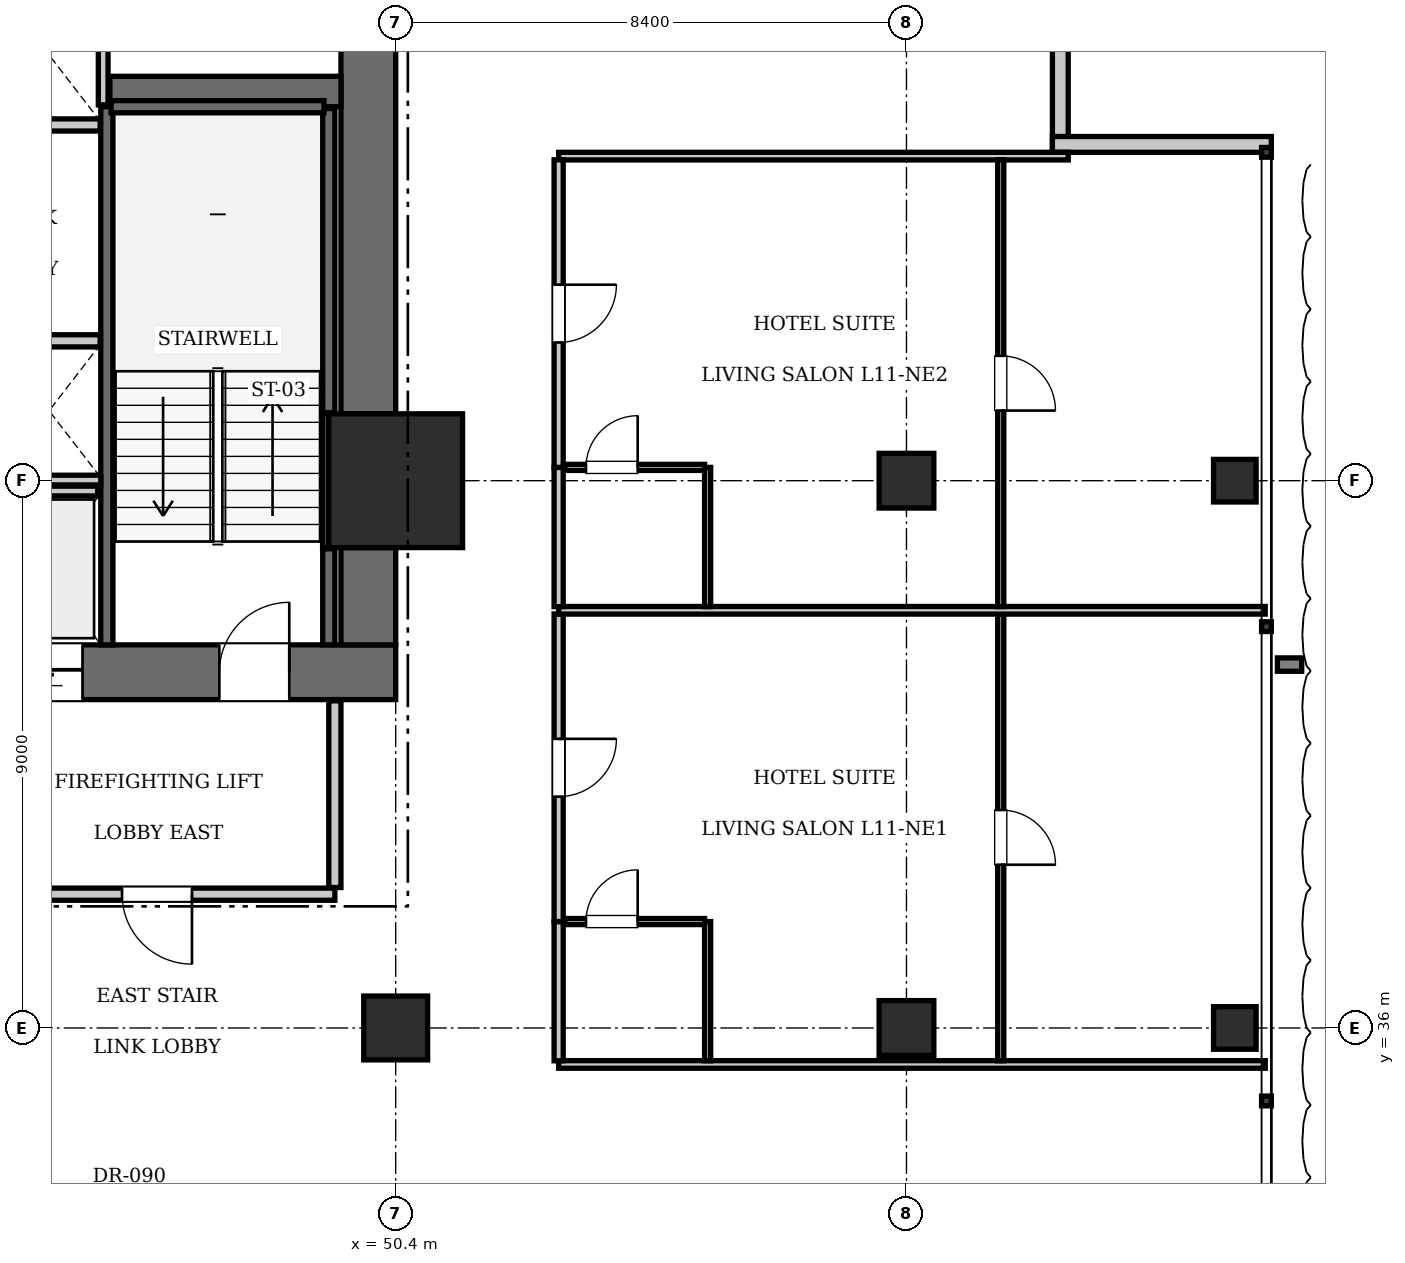
"""IFC4 building model, lengths in metres.
Left out: names, types, materials, properties, quantities, classifications, styles, units other than length and angle.
Written with IfcOpenShell. Run it as: python <this file> out.ifc"""

import sys

from ifc_helpers import new_model, si_unit, direction, frame, frame_2d, origin, origin_2d, place, context, subcontext, project, spatial, rectangle, i_section, extrude, element, fill, save


model = new_model("IFC4")
c1 = context("Model", 3, precision=1e-05, world=origin(), true_north=direction((0.0, 1.0)))
c2 = subcontext(c1, "Body", "Model", "MODEL_VIEW")
j1 = project(units=[si_unit("LENGTHUNIT", "METRE"), si_unit("PLANEANGLEUNIT", "RADIAN")], contexts=[c1])
p1 = place(None, origin())
s1 = spatial("IfcSite", under=j1, at=p1, CompositionType="ELEMENT")
p2 = place(p1, origin())
s2 = spatial("IfcBuilding", under=s1, at=p2, CompositionType="ELEMENT")
p3 = place(p2, frame((0.0, 0.0, 50.05)))
s3 = spatial("IfcBuildingStorey", under=s2, at=p3, CompositionType="ELEMENT", Elevation=50.05)
p4 = place(p3, frame((50.4, 45.0, 0.0), z_axis=(0.0, 0.0, 1.0), x_axis=(1.0, 0.0, 0.0)))
e1 = element("IfcColumn", 1, at=p4, inside=s3, PredefinedType="COLUMN", context=c2, shape_type="SweptSolid", body=[
    extrude(rectangle(XDim=2.2, YDim=2.2, at=origin_2d()), origin(), (0.0, 0.0, 1.0), 3.85),
])
p5 = place(p3, frame((43.6, 41.85, 0.0), z_axis=(0.0, 0.0, 1.0), x_axis=(1.0, 0.0, 0.0)))
e2 = element("IfcWall", 2, at=p5, inside=s3, PredefinedType="SHEAR", context=c2, shape_type="SweptSolid", body=[
    extrude(rectangle(XDim=6.8, YDim=0.9, at=frame_2d((3.4, 0.0))), origin(), (0.0, 0.0, 1.0), 3.85),
])
p6 = place(p5, frame((3.9, 0.0, 0.0)))
e3 = element("IfcOpeningElement", 3, at=p6, cuts=e2, PredefinedType="OPENING", context=c2, shape_type="SweptSolid", body=[
    extrude(rectangle(XDim=1.15, YDim=2.15, at=frame_2d((0.575, 1.075))), frame((0.0, 0.46, 0.0), z_axis=(0.0, -1.0, 0.0), x_axis=(1.0, 0.0, 0.0)), (0.0, 0.0, 1.0), 0.92),
])
p7 = place(p5, frame((0.55, 0.0, 0.0)))
e4 = element("IfcOpeningElement", 4, at=p7, cuts=e2, PredefinedType="OPENING", context=c2, shape_type="SweptSolid", body=[
    extrude(rectangle(XDim=1.1, YDim=2.2, at=frame_2d((0.55, 1.1))), frame((0.0, 0.46, 0.0), z_axis=(0.0, -1.0, 0.0), x_axis=(1.0, 0.0, 0.0)), (0.0, 0.0, 1.0), 0.92),
])
p8 = place(p3, frame((49.95, 42.3, 0.0), z_axis=(0.0, 0.0, 1.0), x_axis=(0.0, 1.0, 0.0)))
e5 = element("IfcWall", 5, at=p8, inside=s3, PredefinedType="SHEAR", context=c2, shape_type="SweptSolid", body=[
    extrude(rectangle(XDim=1.6, YDim=0.9, at=frame_2d((0.8, 0.0))), origin(), (0.0, 0.0, 1.0), 3.85),
])
p9 = place(p3, frame((49.95, 46.1, 0.0), z_axis=(0.0, 0.0, 1.0), x_axis=(0.0, 1.0, 0.0)))
e6 = element("IfcWall", 6, at=p9, inside=s3, PredefinedType="SHEAR", context=c2, shape_type="SweptSolid", body=[
    extrude(rectangle(XDim=7.0, YDim=0.9, at=frame_2d((3.5, 0.0))), origin(), (0.0, 0.0, 1.0), 3.85),
])
p10 = place(p3, frame((45.7, 51.4, 0.0), z_axis=(0.0, 0.0, 1.0), x_axis=(1.0, 0.0, 0.0)))
e7 = element("IfcWall", 7, at=p10, inside=s3, PredefinedType="SHEAR", context=c2, shape_type="SweptSolid", body=[
    extrude(rectangle(XDim=3.8, YDim=0.5, at=frame_2d((1.9, 0.0))), origin(), (0.0, 0.0, 1.0), 3.85),
])
p11 = place(p3, frame((50.4, 36.0, 0.0), z_axis=(0.0, 0.0, 1.0), x_axis=(1.0, 0.0, 0.0)))
e8 = element("IfcColumn", 8, at=p11, inside=s3, PredefinedType="COLUMN", context=c2, shape_type="SweptSolid", body=[
    extrude(rectangle(XDim=1.05, YDim=1.05, at=origin_2d()), origin(), (0.0, 0.0, 1.0), 3.85),
])
for number, where, z_axis, x_axis in (
    (9, (58.8, 36.0, 0.0), (0.0, 0.0, 1.0), (1.0, 0.0, 0.0)),
    (10, (58.8, 45.0, 0.0), (0.0, 0.0, 1.0), (1.0, 0.0, 0.0)),
):
    element("IfcColumn", number, at=place(p3, frame(where, z_axis=z_axis, x_axis=x_axis)), inside=s3, PredefinedType="COLUMN", context=c2, shape_type="SweptSolid", body=[
        extrude(rectangle(XDim=0.9, YDim=0.9, at=origin_2d()), origin(), (0.0, 0.0, 1.0), 3.85),
    ])
for number, where, z_axis, x_axis in (
    (11, (64.2, 36.0, 0.0), (0.0, 0.0, 1.0), (1.0, 0.0, 0.0)),
    (12, (64.2, 45.0, 0.0), (0.0, 0.0, 1.0), (1.0, 0.0, 0.0)),
):
    element("IfcColumn", number, at=place(p3, frame(where, z_axis=z_axis, x_axis=x_axis)), inside=s3, PredefinedType="COLUMN", context=c2, shape_type="SweptSolid", body=[
        extrude(i_section(OverallWidth=0.7, OverallDepth=0.7, WebThickness=0.028, FlangeThickness=0.044, at=origin_2d()), origin(), (0.0, 0.0, 1.0), 3.85),
    ])
p12 = place(p3, frame((45.65, 42.3, 0.0), z_axis=(0.0, 0.0, 1.0), x_axis=(0.0, 1.0, 0.0)))
e13 = element("IfcWall", 13, at=p12, inside=s3, PredefinedType="SOLIDWALL", context=c2, shape_type="SweptSolid", body=[
    extrude(rectangle(XDim=8.85, YDim=0.2, at=frame_2d((4.425, 0.0))), origin(), (0.0, 0.0, 1.0), 3.61),
])
p13 = place(p3, frame((49.3, 42.3, 0.0), z_axis=(0.0, 0.0, 1.0), x_axis=(0.0, 1.0, 0.0)))
e14 = element("IfcWall", 14, at=p13, inside=s3, PredefinedType="SOLIDWALL", context=c2, shape_type="SweptSolid", body=[
    extrude(rectangle(XDim=1.58, YDim=0.2, at=frame_2d((0.79, 0.0))), origin(), (0.0, 0.0, 1.0), 3.61),
])
p14 = place(p3, frame((49.3, 46.12, 0.0), z_axis=(0.0, 0.0, 1.0), x_axis=(0.0, 1.0, 0.0)))
e15 = element("IfcWall", 15, at=p14, inside=s3, PredefinedType="SOLIDWALL", context=c2, shape_type="SweptSolid", body=[
    extrude(rectangle(XDim=5.0, YDim=0.2, at=frame_2d((2.5, 0.0))), origin(), (0.0, 0.0, 1.0), 3.61),
])
p15 = place(p3, frame((45.72, 51.15, 0.0), z_axis=(0.0, 0.0, 1.0), x_axis=(1.0, 0.0, 0.0)))
e16 = element("IfcWall", 16, at=p15, inside=s3, PredefinedType="SOLIDWALL", context=c2, shape_type="SweptSolid", body=[
    extrude(rectangle(XDim=3.5, YDim=0.2, at=frame_2d((1.75, 0.0))), origin(), (0.0, 0.0, 1.0), 3.61),
])
p16 = place(p3, frame((49.248, 43.9, 0.0), z_axis=(0.0, 0.0, 1.0), x_axis=(0.0, 1.0, 0.0)))
e17 = element("IfcWall", 17, at=p16, inside=s3, PredefinedType="SOLIDWALL", context=c2, shape_type="SweptSolid", body=[
    extrude(rectangle(XDim=2.2, YDim=0.1, at=frame_2d((1.1, 0.0))), origin(), (0.0, 0.0, 1.0), 3.61),
])
for number, where, z_axis, x_axis in (
    (18, (43.86, 47.3, 0.0), (0.0, 0.0, 1.0), (1.0, 0.0, 0.0)),
    (19, (43.86, 50.85, 0.0), (0.0, 0.0, 1.0), (1.0, 0.0, 0.0)),
):
    element("IfcWall", number, at=place(p3, frame(where, z_axis=z_axis, x_axis=x_axis)), inside=s3, PredefinedType="SOLIDWALL", context=c2, shape_type="SweptSolid", body=[
        extrude(rectangle(XDim=1.68, YDim=0.2, at=frame_2d((0.84, 0.0))), origin(), (0.0, 0.0, 1.0), 3.61),
    ])
p17 = place(p3, frame((43.9, 44.83, 0.0), z_axis=(0.0, 0.0, 1.0), x_axis=(1.0, 0.0, 0.0)))
e20 = element("IfcWall", 20, at=p17, inside=s3, PredefinedType="SOLIDWALL", context=c2, shape_type="SweptSolid", body=[
    extrude(rectangle(XDim=1.6, YDim=0.16, at=frame_2d((0.8, 0.0))), origin(), (0.0, 0.0, 1.0), 3.61),
])
p18 = place(p3, frame((42.1, 45.01, 0.0), z_axis=(0.0, 0.0, 1.0), x_axis=(1.0, 0.0, 0.0)))
e21 = element("IfcWall", 21, at=p18, inside=s3, PredefinedType="SOLIDWALL", context=c2, shape_type="SweptSolid", body=[
    extrude(rectangle(XDim=3.45, YDim=0.16, at=frame_2d((1.725, 0.0))), origin(), (0.0, 0.0, 1.0), 3.61),
])
p19 = place(p3, frame((45.59, 51.18, 0.0), z_axis=(0.0, 0.0, 1.0), x_axis=(0.0, 1.0, 0.0)))
e22 = element("IfcWall", 22, at=p19, inside=s3, PredefinedType="SOLIDWALL", context=c2, shape_type="SweptSolid", body=[
    extrude(rectangle(XDim=1.92, YDim=0.16, at=frame_2d((0.96, 0.0))), origin(), (0.0, 0.0, 1.0), 3.61),
])
for number, where, z_axis, x_axis in (
    (23, (61.33, 54.0, 0.0), (0.0, 0.0, 1.0), (0.0, -1.0, 0.0)),
    (24, (61.2, 50.53, 0.0), (0.0, 0.0, 1.0), (1.0, 0.0, 0.0)),
):
    element("IfcWall", number, at=place(p3, frame(where, z_axis=z_axis, x_axis=x_axis)), inside=s3, PredefinedType="SOLIDWALL", context=c2, shape_type="SweptSolid", body=[
        extrude(rectangle(XDim=3.6, YDim=0.26, at=frame_2d((1.8, 0.0))), origin(), (0.0, 0.0, 1.0), 3.61),
    ])
p20 = place(p3, frame((43.6, 38.2, 0.0), z_axis=(0.0, 0.0, 1.0), x_axis=(1.0, 0.0, 0.0)))
e25 = element("IfcWall", 25, at=p20, inside=s3, PredefinedType="PARTITIONING", context=c2, shape_type="SweptSolid", body=[
    extrude(rectangle(XDim=5.8, YDim=0.2, at=frame_2d((2.9, 0.0))), origin(), (0.0, 0.0, 1.0), 3.61),
])
p21 = place(p20, frame((2.3, 0.0, 0.0)))
e26 = element("IfcOpeningElement", 26, at=p21, cuts=e25, PredefinedType="OPENING", context=c2, shape_type="SweptSolid", body=[
    extrude(rectangle(XDim=1.15, YDim=2.15, at=frame_2d((0.575, 1.075))), frame((0.0, 0.11, 0.0), z_axis=(0.0, -1.0, 0.0), x_axis=(1.0, 0.0, 0.0)), (0.0, 0.0, 1.0), 0.22),
])
p22 = place(p3, frame((49.4, 38.31, 0.0), z_axis=(0.0, 0.0, 1.0), x_axis=(0.0, 1.0, 0.0)))
e27 = element("IfcWall", 27, at=p22, inside=s3, PredefinedType="PARTITIONING", context=c2, shape_type="SweptSolid", body=[
    extrude(rectangle(XDim=3.07, YDim=0.2, at=frame_2d((1.535, 0.0))), origin(), (0.0, 0.0, 1.0), 3.61),
])
p23 = place(p3, frame((53.08, 35.4, 0.0), z_axis=(0.0, 0.0, 1.0), x_axis=(1.0, 0.0, 0.0)))
e28 = element("IfcWall", 28, at=p23, inside=s3, PredefinedType="PARTITIONING", context=c2, shape_type="SweptSolid", body=[
    extrude(rectangle(XDim=11.62, YDim=0.125, at=frame_2d((5.81, 0.0))), origin(), (0.0, 0.0, 1.0), 3.61),
])
p24 = place(p3, frame((53.08, 50.337, 0.0), z_axis=(0.0, 0.0, 1.0), x_axis=(1.0, 0.0, 0.0)))
e29 = element("IfcWall", 29, at=p24, inside=s3, PredefinedType="PARTITIONING", context=c2, shape_type="SweptSolid", body=[
    extrude(rectangle(XDim=8.38, YDim=0.125, at=frame_2d((4.19, 0.0))), origin(), (0.0, 0.0, 1.0), 3.61),
])
p25 = place(p3, frame((53.08, 35.46, 0.0), z_axis=(0.0, 0.0, 1.0), x_axis=(0.0, 1.0, 0.0)))
e30 = element("IfcWall", 30, at=p25, inside=s3, PredefinedType="PARTITIONING", context=c2, shape_type="SweptSolid", body=[
    extrude(rectangle(XDim=2.29, YDim=0.15, at=frame_2d((1.145, 0.0))), origin(), (0.0, 0.0, 1.0), 3.61),
])
p26 = place(p3, frame((53.08, 37.75, 0.0), z_axis=(0.0, 0.0, 1.0), x_axis=(0.0, 1.0, 0.0)))
e31 = element("IfcWall", 31, at=p26, inside=s3, PredefinedType="PARTITIONING", context=c2, shape_type="SweptSolid", body=[
    extrude(rectangle(XDim=5.059, YDim=0.15, at=frame_2d((2.529, 0.0))), origin(), (0.0, 0.0, 1.0), 3.61),
])
p27 = place(p26, frame((2.054, 0.0, 0.0)))
e32 = element("IfcOpeningElement", 32, at=p27, cuts=e31, PredefinedType="OPENING", context=c2, shape_type="SweptSolid", body=[
    extrude(rectangle(XDim=0.95, YDim=2.15, at=frame_2d((0.475, 1.075))), frame((0.0, 0.085, 0.0), z_axis=(0.0, -1.0, 0.0), x_axis=(1.0, 0.0, 0.0)), (0.0, 0.0, 1.0), 0.17),
])
p28 = place(p3, frame((55.53, 35.46, 0.0), z_axis=(0.0, 0.0, 1.0), x_axis=(0.0, 1.0, 0.0)))
e33 = element("IfcWall", 33, at=p28, inside=s3, PredefinedType="PARTITIONING", context=c2, shape_type="SweptSolid", body=[
    extrude(rectangle(XDim=2.29, YDim=0.1, at=frame_2d((1.145, 0.0))), origin(), (0.0, 0.0, 1.0), 3.61),
])
p29 = place(p3, frame((53.18, 37.75, 0.0), z_axis=(0.0, 0.0, 1.0), x_axis=(1.0, 0.0, 0.0)))
e34 = element("IfcWall", 34, at=p29, inside=s3, PredefinedType="PARTITIONING", context=c2, shape_type="SweptSolid", body=[
    extrude(rectangle(XDim=2.3, YDim=0.1, at=frame_2d((1.15, 0.0))), origin(), (0.0, 0.0, 1.0), 3.61),
])
p30 = place(p29, frame((0.35, 0.0, 0.0)))
e35 = element("IfcOpeningElement", 35, at=p30, cuts=e34, PredefinedType="OPENING", context=c2, shape_type="SweptSolid", body=[
    extrude(rectangle(XDim=0.85, YDim=2.1, at=frame_2d((0.425, 1.05))), frame((0.0, 0.06, 0.0), z_axis=(0.0, -1.0, 0.0), x_axis=(1.0, 0.0, 0.0)), (0.0, 0.0, 1.0), 0.12),
])
p31 = place(p3, frame((60.35, 35.46, 0.0), z_axis=(0.0, 0.0, 1.0), x_axis=(0.0, 1.0, 0.0)))
e36 = element("IfcWall", 36, at=p31, inside=s3, PredefinedType="PARTITIONING", context=c2, shape_type="SweptSolid", body=[
    extrude(rectangle(XDim=7.349, YDim=0.1, at=frame_2d((3.674, 0.0))), origin(), (0.0, 0.0, 1.0), 3.61),
])
p32 = place(p31, frame((3.224, 0.0, 0.0)))
e37 = element("IfcOpeningElement", 37, at=p32, cuts=e36, PredefinedType="OPENING", context=c2, shape_type="SweptSolid", body=[
    extrude(rectangle(XDim=0.9, YDim=2.1, at=frame_2d((0.45, 1.05))), frame((0.0, 0.06, 0.0), z_axis=(0.0, -1.0, 0.0), x_axis=(1.0, 0.0, 0.0)), (0.0, 0.0, 1.0), 0.12),
])
p33 = place(p3, frame((53.08, 42.869, 0.0), z_axis=(0.0, 0.0, 1.0), x_axis=(1.0, 0.0, 0.0)))
e38 = element("IfcWall", 38, at=p33, inside=s3, PredefinedType="PARTITIONING", context=c2, shape_type="SweptSolid", body=[
    extrude(rectangle(XDim=11.62, YDim=0.125, at=frame_2d((5.81, 0.0))), origin(), (0.0, 0.0, 1.0), 3.61),
])
p34 = place(p3, frame((53.08, 42.929, 0.0), z_axis=(0.0, 0.0, 1.0), x_axis=(0.0, 1.0, 0.0)))
e39 = element("IfcWall", 39, at=p34, inside=s3, PredefinedType="PARTITIONING", context=c2, shape_type="SweptSolid", body=[
    extrude(rectangle(XDim=2.29, YDim=0.15, at=frame_2d((1.145, 0.0))), origin(), (0.0, 0.0, 1.0), 3.61),
])
p35 = place(p3, frame((53.08, 45.219, 0.0), z_axis=(0.0, 0.0, 1.0), x_axis=(0.0, 1.0, 0.0)))
e40 = element("IfcWall", 40, at=p35, inside=s3, PredefinedType="PARTITIONING", context=c2, shape_type="SweptSolid", body=[
    extrude(rectangle(XDim=5.059, YDim=0.15, at=frame_2d((2.529, 0.0))), origin(), (0.0, 0.0, 1.0), 3.61),
])
p36 = place(p35, frame((2.054, 0.0, 0.0)))
e41 = element("IfcOpeningElement", 41, at=p36, cuts=e40, PredefinedType="OPENING", context=c2, shape_type="SweptSolid", body=[
    extrude(rectangle(XDim=0.95, YDim=2.15, at=frame_2d((0.475, 1.075))), frame((0.0, 0.085, 0.0), z_axis=(0.0, -1.0, 0.0), x_axis=(1.0, 0.0, 0.0)), (0.0, 0.0, 1.0), 0.17),
])
p37 = place(p3, frame((55.53, 42.929, 0.0), z_axis=(0.0, 0.0, 1.0), x_axis=(0.0, 1.0, 0.0)))
e42 = element("IfcWall", 42, at=p37, inside=s3, PredefinedType="PARTITIONING", context=c2, shape_type="SweptSolid", body=[
    extrude(rectangle(XDim=2.29, YDim=0.1, at=frame_2d((1.145, 0.0))), origin(), (0.0, 0.0, 1.0), 3.61),
])
p38 = place(p3, frame((53.18, 45.219, 0.0), z_axis=(0.0, 0.0, 1.0), x_axis=(1.0, 0.0, 0.0)))
e43 = element("IfcWall", 43, at=p38, inside=s3, PredefinedType="PARTITIONING", context=c2, shape_type="SweptSolid", body=[
    extrude(rectangle(XDim=2.3, YDim=0.1, at=frame_2d((1.15, 0.0))), origin(), (0.0, 0.0, 1.0), 3.61),
])
p39 = place(p38, frame((0.35, 0.0, 0.0)))
e44 = element("IfcOpeningElement", 44, at=p39, cuts=e43, PredefinedType="OPENING", context=c2, shape_type="SweptSolid", body=[
    extrude(rectangle(XDim=0.85, YDim=2.1, at=frame_2d((0.425, 1.05))), frame((0.0, 0.06, 0.0), z_axis=(0.0, -1.0, 0.0), x_axis=(1.0, 0.0, 0.0)), (0.0, 0.0, 1.0), 0.12),
])
p40 = place(p3, frame((60.35, 42.929, 0.0), z_axis=(0.0, 0.0, 1.0), x_axis=(0.0, 1.0, 0.0)))
e45 = element("IfcWall", 45, at=p40, inside=s3, PredefinedType="PARTITIONING", context=c2, shape_type="SweptSolid", body=[
    extrude(rectangle(XDim=7.349, YDim=0.1, at=frame_2d((3.674, 0.0))), origin(), (0.0, 0.0, 1.0), 3.61),
])
p41 = place(p40, frame((3.224, 0.0, 0.0)))
e46 = element("IfcOpeningElement", 46, at=p41, cuts=e45, PredefinedType="OPENING", context=c2, shape_type="SweptSolid", body=[
    extrude(rectangle(XDim=0.9, YDim=2.1, at=frame_2d((0.45, 1.05))), frame((0.0, 0.06, 0.0), z_axis=(0.0, -1.0, 0.0), x_axis=(1.0, 0.0, 0.0)), (0.0, 0.0, 1.0), 0.12),
])
p42 = place(p6, origin())
e47 = element("IfcDoor", 47, at=p42, inside=s3, OperationType="SINGLE_SWING_RIGHT", PredefinedType="DOOR", context=c2, shape_type="SweptSolid", body=[
    extrude(rectangle(XDim=1.15, YDim=2.15, at=frame_2d((0.575, 1.075))), frame((0.0, 0.025, 0.0), z_axis=(0.0, -1.0, 0.0), x_axis=(1.0, 0.0, 0.0)), (0.0, 0.0, 1.0), 0.05),
])
fill(e3, e47)
p43 = place(p7, frame((1.1, 0.0, 0.0), z_axis=(0.0, 0.0, 1.0), x_axis=(-1.0, 0.0, 0.0)))
e48 = element("IfcDoor", 48, at=p43, inside=s3, OperationType="SLIDING_TO_LEFT", PredefinedType="DOOR", context=c2, shape_type="SweptSolid", body=[
    extrude(rectangle(XDim=1.1, YDim=2.2, at=frame_2d((0.55, 1.1))), frame((0.0, 0.025, 0.0), z_axis=(0.0, -1.0, 0.0), x_axis=(1.0, 0.0, 0.0)), (0.0, 0.0, 1.0), 0.05),
])
fill(e4, e48)
p44 = place(p21, frame((1.15, 0.0, 0.0), z_axis=(0.0, 0.0, 1.0), x_axis=(-1.0, 0.0, 0.0)))
e49 = element("IfcDoor", 49, at=p44, inside=s3, OperationType="SINGLE_SWING_LEFT", PredefinedType="DOOR", context=c2, shape_type="SweptSolid", body=[
    extrude(rectangle(XDim=1.15, YDim=2.15, at=frame_2d((0.575, 1.075))), frame((0.0, 0.025, 0.0), z_axis=(0.0, -1.0, 0.0), x_axis=(1.0, 0.0, 0.0)), (0.0, 0.0, 1.0), 0.05),
])
fill(e26, e49)
p45 = place(p30, origin())
e50 = element("IfcDoor", 50, at=p45, inside=s3, OperationType="SINGLE_SWING_RIGHT", PredefinedType="DOOR", context=c2, shape_type="SweptSolid", body=[
    extrude(rectangle(XDim=0.85, YDim=2.1, at=frame_2d((0.425, 1.05))), frame((0.0, 0.025, 0.0), z_axis=(0.0, -1.0, 0.0), x_axis=(1.0, 0.0, 0.0)), (0.0, 0.0, 1.0), 0.05),
])
fill(e35, e50)
p46 = place(p27, frame((0.95, 0.0, 0.0), z_axis=(0.0, 0.0, 1.0), x_axis=(-1.0, 0.0, 0.0)))
e51 = element("IfcDoor", 51, at=p46, inside=s3, OperationType="SINGLE_SWING_LEFT", PredefinedType="DOOR", context=c2, shape_type="SweptSolid", body=[
    extrude(rectangle(XDim=0.95, YDim=2.15, at=frame_2d((0.475, 1.075))), frame((0.0, 0.025, 0.0), z_axis=(0.0, -1.0, 0.0), x_axis=(1.0, 0.0, 0.0)), (0.0, 0.0, 1.0), 0.05),
])
fill(e32, e51)
p47 = place(p32, frame((0.9, 0.0, 0.0), z_axis=(0.0, 0.0, 1.0), x_axis=(-1.0, 0.0, 0.0)))
e52 = element("IfcDoor", 52, at=p47, inside=s3, OperationType="SINGLE_SWING_RIGHT", PredefinedType="DOOR", context=c2, shape_type="SweptSolid", body=[
    extrude(rectangle(XDim=0.9, YDim=2.1, at=frame_2d((0.45, 1.05))), frame((0.0, 0.025, 0.0), z_axis=(0.0, -1.0, 0.0), x_axis=(1.0, 0.0, 0.0)), (0.0, 0.0, 1.0), 0.05),
])
fill(e37, e52)
p48 = place(p39, origin())
e53 = element("IfcDoor", 53, at=p48, inside=s3, OperationType="SINGLE_SWING_RIGHT", PredefinedType="DOOR", context=c2, shape_type="SweptSolid", body=[
    extrude(rectangle(XDim=0.85, YDim=2.1, at=frame_2d((0.425, 1.05))), frame((0.0, 0.025, 0.0), z_axis=(0.0, -1.0, 0.0), x_axis=(1.0, 0.0, 0.0)), (0.0, 0.0, 1.0), 0.05),
])
fill(e44, e53)
p49 = place(p36, frame((0.95, 0.0, 0.0), z_axis=(0.0, 0.0, 1.0), x_axis=(-1.0, 0.0, 0.0)))
e54 = element("IfcDoor", 54, at=p49, inside=s3, OperationType="SINGLE_SWING_LEFT", PredefinedType="DOOR", context=c2, shape_type="SweptSolid", body=[
    extrude(rectangle(XDim=0.95, YDim=2.15, at=frame_2d((0.475, 1.075))), frame((0.0, 0.025, 0.0), z_axis=(0.0, -1.0, 0.0), x_axis=(1.0, 0.0, 0.0)), (0.0, 0.0, 1.0), 0.05),
])
fill(e41, e54)
p50 = place(p41, frame((0.9, 0.0, 0.0), z_axis=(0.0, 0.0, 1.0), x_axis=(-1.0, 0.0, 0.0)))
e55 = element("IfcDoor", 55, at=p50, inside=s3, OperationType="SINGLE_SWING_RIGHT", PredefinedType="DOOR", context=c2, shape_type="SweptSolid", body=[
    extrude(rectangle(XDim=0.9, YDim=2.1, at=frame_2d((0.45, 1.05))), frame((0.0, 0.025, 0.0), z_axis=(0.0, -1.0, 0.0), x_axis=(1.0, 0.0, 0.0)), (0.0, 0.0, 1.0), 0.05),
])
fill(e46, e55)
save(model, sys.argv[1])
